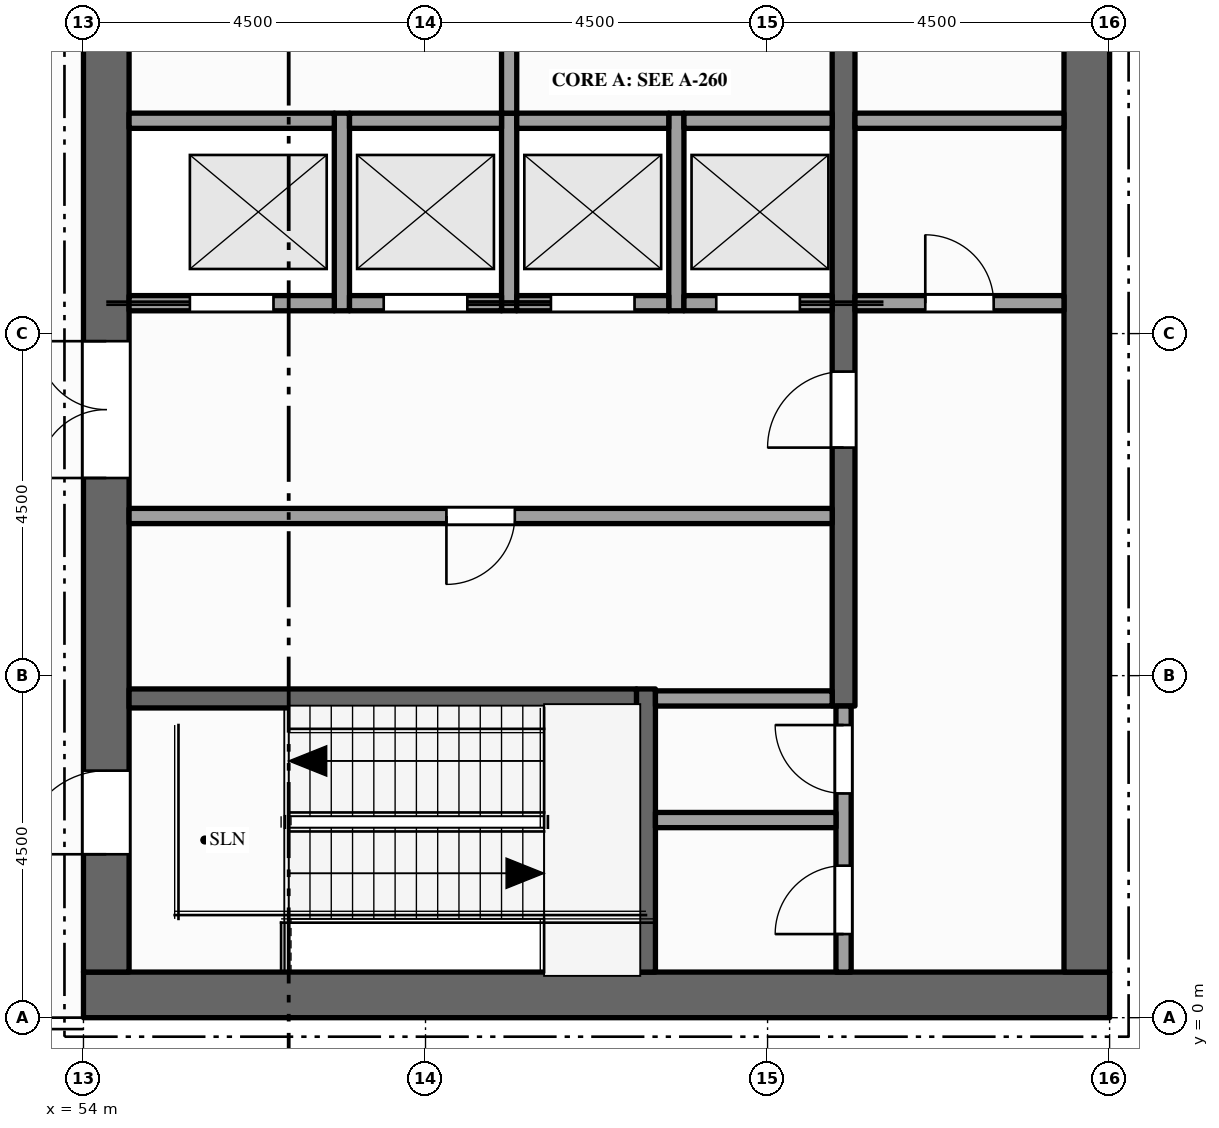
"""IFC4 building model, lengths in metres.
Left out: names, types, materials, properties, quantities, classifications, styles, units other than length and angle.
Written with IfcOpenShell. Run it as: python <this file> out.ifc"""

import sys

from ifc_helpers import new_model, si_unit, direction, frame, frame_2d, origin, place, context, subcontext, project, spatial, rectangle, extrude, element, fill, save


model = new_model("IFC4")
c1 = context("Model", 3, precision=1e-05, world=origin(), true_north=direction((0.0, 1.0)))
c2 = subcontext(c1, "Body", "Model", "MODEL_VIEW")
j1 = project(units=[si_unit("LENGTHUNIT", "METRE"), si_unit("PLANEANGLEUNIT", "RADIAN")], contexts=[c1])
p1 = place(None, origin())
s1 = spatial("IfcSite", under=j1, at=p1, CompositionType="ELEMENT")
p2 = place(p1, origin())
s2 = spatial("IfcBuilding", under=s1, at=p2, CompositionType="ELEMENT")
p3 = place(p2, frame((0.0, 0.0, 332.0)))
s3 = spatial("IfcBuildingStorey", under=s2, at=p3, CompositionType="ELEMENT", Elevation=332.0)
p4 = place(p3, frame((67.5, 0.3, -0.15), z_axis=(0.0, 0.0, 1.0), x_axis=(-1.0, 0.0, 0.0)))
e1 = element("IfcWall", 1, at=p4, inside=s3, PredefinedType="SHEAR", context=c2, shape_type="SweptSolid", body=[
    extrude(rectangle(XDim=13.5, YDim=0.6, at=frame_2d((6.75, 0.0))), origin(), (0.0, 0.0, 1.0), 4.5),
])
p5 = place(p3, frame((54.3, 0.6, -0.15), z_axis=(0.0, 0.0, 1.0), x_axis=(0.0, 1.0, 0.0)))
e2 = element("IfcWall", 2, at=p5, inside=s3, PredefinedType="SHEAR", context=c2, shape_type="SweptSolid", body=[
    extrude(rectangle(XDim=21.3, YDim=0.6, at=frame_2d((10.65, 0.0))), origin(), (0.0, 0.0, 1.0), 4.5),
])
p6 = place(p5, frame((6.5, 0.0, 0.15)))
e3 = element("IfcOpeningElement", 3, at=p6, cuts=e2, PredefinedType="OPENING", context=c2, shape_type="SweptSolid", body=[
    extrude(rectangle(XDim=1.8, YDim=2.1, at=frame_2d((0.9, 1.05))), frame((0.0, 0.31, 0.0), z_axis=(0.0, -1.0, 0.0), x_axis=(1.0, 0.0, 0.0)), (0.0, 0.0, 1.0), 0.62),
])
p7 = place(p5, frame((12.55, 0.0, 0.15)))
e4 = element("IfcOpeningElement", 4, at=p7, cuts=e2, PredefinedType="OPENING", context=c2, shape_type="SweptSolid", body=[
    extrude(rectangle(XDim=1.1, YDim=2.1, at=frame_2d((0.55, 1.05))), frame((0.0, 0.31, 0.0), z_axis=(0.0, -1.0, 0.0), x_axis=(1.0, 0.0, 0.0)), (0.0, 0.0, 1.0), 0.62),
])
p8 = place(p5, frame((1.55, 0.0, 0.15)))
e5 = element("IfcOpeningElement", 5, at=p8, cuts=e2, PredefinedType="OPENING", context=c2, shape_type="SweptSolid", body=[
    extrude(rectangle(XDim=1.1, YDim=2.1, at=frame_2d((0.55, 1.05))), frame((0.0, 0.31, 0.0), z_axis=(0.0, -1.0, 0.0), x_axis=(1.0, 0.0, 0.0)), (0.0, 0.0, 1.0), 0.62),
])
p9 = place(p5, frame((18.75, 0.0, 0.15)))
e6 = element("IfcOpeningElement", 6, at=p9, cuts=e2, PredefinedType="OPENING", context=c2, shape_type="SweptSolid", body=[
    extrude(rectangle(XDim=1.1, YDim=2.1, at=frame_2d((0.55, 1.05))), frame((0.0, 0.31, 0.0), z_axis=(0.0, -1.0, 0.0), x_axis=(1.0, 0.0, 0.0)), (0.0, 0.0, 1.0), 0.62),
])
p10 = place(p3, frame((67.2, 0.6, -0.15), z_axis=(0.0, 0.0, 1.0), x_axis=(0.0, 1.0, 0.0)))
e7 = element("IfcWall", 7, at=p10, inside=s3, PredefinedType="SHEAR", context=c2, shape_type="SweptSolid", body=[
    extrude(rectangle(XDim=21.3, YDim=0.6, at=frame_2d((10.65, 0.0))), origin(), (0.0, 0.0, 1.0), 4.5),
])
for number, where, z_axis, x_axis in (
    (8, (57.4, 9.3, 0.0), (0.0, 0.0, 1.0), (0.0, 1.0, 0.0)),
    (9, (59.6, 9.3, 0.0), (0.0, 0.0, 1.0), (0.0, 1.0, 0.0)),
):
    element("IfcWall", number, at=place(p3, frame(where, z_axis=z_axis, x_axis=x_axis)), inside=s3, PredefinedType="SOLIDWALL", context=c2, shape_type="SweptSolid", body=[
        extrude(rectangle(XDim=2.6, YDim=0.2, at=frame_2d((1.3, 0.0))), origin(), (0.0, 0.0, 1.0), 4.35),
    ])
p11 = place(p3, frame((59.6, 11.9, 0.0), z_axis=(0.0, 0.0, 1.0), x_axis=(0.0, 1.0, 0.0)))
e10 = element("IfcWall", 10, at=p11, inside=s3, PredefinedType="PARTITIONING", context=c2, shape_type="SweptSolid", body=[
    extrude(rectangle(XDim=3.6, YDim=0.2, at=frame_2d((1.8, 0.0))), origin(), (0.0, 0.0, 1.0), 4.35),
])
p12 = place(p11, frame((1.3, 0.0, 0.0)))
e11 = element("IfcOpeningElement", 11, at=p12, cuts=e10, PredefinedType="OPENING", context=c2, shape_type="SweptSolid", body=[
    extrude(rectangle(XDim=1.0, YDim=2.1, at=frame_2d((0.5, 1.05))), frame((0.0, 0.11, 0.0), z_axis=(0.0, -1.0, 0.0), x_axis=(1.0, 0.0, 0.0)), (0.0, 0.0, 1.0), 0.22),
])
p13 = place(p3, frame((61.4, 0.6, 0.0), z_axis=(0.0, 0.0, 1.0), x_axis=(0.0, 1.0, 0.0)))
e12 = element("IfcWall", 12, at=p13, inside=s3, PredefinedType="SHEAR", context=c2, shape_type="SweptSolid", body=[
    extrude(rectangle(XDim=3.725, YDim=0.25, at=frame_2d((1.862, 0.0))), origin(), (0.0, 0.0, 1.0), 4.35),
])
p14 = place(p3, frame((61.8, 9.3, 0.0), z_axis=(0.0, 0.0, 1.0), x_axis=(0.0, 1.0, 0.0)))
e13 = element("IfcWall", 13, at=p14, inside=s3, PredefinedType="SOLIDWALL", context=c2, shape_type="SweptSolid", body=[
    extrude(rectangle(XDim=2.6, YDim=0.2, at=frame_2d((1.3, 0.0))), origin(), (0.0, 0.0, 1.0), 4.35),
])
p15 = place(p3, frame((64.0, 0.6, 0.0), z_axis=(0.0, 0.0, 1.0), x_axis=(0.0, 1.0, 0.0)))
e14 = element("IfcWall", 14, at=p15, inside=s3, PredefinedType="PARTITIONING", context=c2, shape_type="SweptSolid", body=[
    extrude(rectangle(XDim=3.5, YDim=0.2, at=frame_2d((1.75, 0.0))), origin(), (0.0, 0.0, 1.0), 4.35),
])
p16 = place(p15, frame((0.5, 0.0, 0.0)))
e15 = element("IfcOpeningElement", 15, at=p16, cuts=e14, PredefinedType="OPENING", context=c2, shape_type="SweptSolid", body=[
    extrude(rectangle(XDim=0.9, YDim=2.1, at=frame_2d((0.45, 1.05))), frame((0.0, 0.11, 0.0), z_axis=(0.0, -1.0, 0.0), x_axis=(1.0, 0.0, 0.0)), (0.0, 0.0, 1.0), 0.22),
])
p17 = place(p15, frame((2.35, 0.0, 0.0)))
e16 = element("IfcOpeningElement", 16, at=p17, cuts=e14, PredefinedType="OPENING", context=c2, shape_type="SweptSolid", body=[
    extrude(rectangle(XDim=0.9, YDim=2.1, at=frame_2d((0.45, 1.05))), frame((0.0, 0.11, 0.0), z_axis=(0.0, -1.0, 0.0), x_axis=(1.0, 0.0, 0.0)), (0.0, 0.0, 1.0), 0.22),
])
p18 = place(p3, frame((64.0, 4.1, 0.0), z_axis=(0.0, 0.0, 1.0), x_axis=(0.0, 1.0, 0.0)))
e17 = element("IfcWall", 17, at=p18, inside=s3, PredefinedType="SHEAR", context=c2, shape_type="SweptSolid", body=[
    extrude(rectangle(XDim=14.5, YDim=0.3, at=frame_2d((7.25, 0.0))), origin(), (0.0, 0.0, 1.0), 4.35),
])
p19 = place(p18, frame((3.4, 0.0, 0.0)))
e18 = element("IfcOpeningElement", 18, at=p19, cuts=e17, PredefinedType="OPENING", context=c2, shape_type="SweptSolid", body=[
    extrude(rectangle(XDim=1.0, YDim=2.1, at=frame_2d((0.5, 1.05))), frame((0.0, 0.16, 0.0), z_axis=(0.0, -1.0, 0.0), x_axis=(1.0, 0.0, 0.0)), (0.0, 0.0, 1.0), 0.32),
])
p20 = place(p18, frame((9.1, 0.0, 0.0)))
e19 = element("IfcOpeningElement", 19, at=p20, cuts=e17, PredefinedType="OPENING", context=c2, shape_type="SweptSolid", body=[
    extrude(rectangle(XDim=1.0, YDim=2.1, at=frame_2d((0.5, 1.05))), frame((0.0, 0.16, 0.0), z_axis=(0.0, -1.0, 0.0), x_axis=(1.0, 0.0, 0.0)), (0.0, 0.0, 1.0), 0.32),
])
p21 = place(p3, frame((61.525, 2.6, 0.0), z_axis=(0.0, 0.0, 1.0), x_axis=(1.0, 0.0, 0.0)))
e20 = element("IfcWall", 20, at=p21, inside=s3, PredefinedType="PARTITIONING", context=c2, shape_type="SweptSolid", body=[
    extrude(rectangle(XDim=2.375, YDim=0.2, at=frame_2d((1.188, 0.0))), origin(), (0.0, 0.0, 1.0), 4.35),
])
p22 = place(p3, frame((54.6, 4.2, 0.0), z_axis=(0.0, 0.0, 1.0), x_axis=(1.0, 0.0, 0.0)))
e21 = element("IfcWall", 21, at=p22, inside=s3, PredefinedType="SHEAR", context=c2, shape_type="SweptSolid", body=[
    extrude(rectangle(XDim=6.675, YDim=0.25, at=frame_2d((3.337, 0.0))), origin(), (0.0, 0.0, 1.0), 4.35),
])
p23 = place(p3, frame((61.525, 4.2, 0.0), z_axis=(0.0, 0.0, 1.0), x_axis=(1.0, 0.0, 0.0)))
e22 = element("IfcWall", 22, at=p23, inside=s3, PredefinedType="PARTITIONING", context=c2, shape_type="SweptSolid", body=[
    extrude(rectangle(XDim=2.325, YDim=0.2, at=frame_2d((1.163, 0.0))), origin(), (0.0, 0.0, 1.0), 4.35),
])
p24 = place(p3, frame((54.6, 6.6, 0.0), z_axis=(0.0, 0.0, 1.0), x_axis=(1.0, 0.0, 0.0)))
e23 = element("IfcWall", 23, at=p24, inside=s3, PredefinedType="PARTITIONING", context=c2, shape_type="SweptSolid", body=[
    extrude(rectangle(XDim=9.25, YDim=0.2, at=frame_2d((4.625, 0.0))), origin(), (0.0, 0.0, 1.0), 4.35),
])
p25 = place(p24, frame((4.175, 0.0, 0.0)))
e24 = element("IfcOpeningElement", 24, at=p25, cuts=e23, PredefinedType="OPENING", context=c2, shape_type="SweptSolid", body=[
    extrude(rectangle(XDim=0.9, YDim=2.1, at=frame_2d((0.45, 1.05))), frame((0.0, 0.11, 0.0), z_axis=(0.0, -1.0, 0.0), x_axis=(1.0, 0.0, 0.0)), (0.0, 0.0, 1.0), 0.22),
])
p26 = place(p3, frame((54.6, 9.4, 0.0), z_axis=(0.0, 0.0, 1.0), x_axis=(1.0, 0.0, 0.0)))
e25 = element("IfcWall", 25, at=p26, inside=s3, PredefinedType="SOLIDWALL", context=c2, shape_type="SweptSolid", body=[
    extrude(rectangle(XDim=2.7, YDim=0.2, at=frame_2d((1.35, 0.0))), origin(), (0.0, 0.0, 1.0), 4.35),
])
p27 = place(p26, frame((0.8, 0.0, 0.012)))
e26 = element("IfcOpeningElement", 26, at=p27, cuts=e25, PredefinedType="OPENING", context=c2, shape_type="SweptSolid", body=[
    extrude(rectangle(XDim=1.1, YDim=2.1, at=frame_2d((0.55, 1.05))), frame((0.0, 0.11, 0.0), z_axis=(0.0, -1.0, 0.0), x_axis=(1.0, 0.0, 0.0)), (0.0, 0.0, 1.0), 0.22),
])
p28 = place(p3, frame((57.5, 9.4, 0.0), z_axis=(0.0, 0.0, 1.0), x_axis=(1.0, 0.0, 0.0)))
e27 = element("IfcWall", 27, at=p28, inside=s3, PredefinedType="SOLIDWALL", context=c2, shape_type="SweptSolid", body=[
    extrude(rectangle(XDim=2.0, YDim=0.2, at=frame_2d((1.0, 0.0))), origin(), (0.0, 0.0, 1.0), 4.35),
])
p29 = place(p28, frame((0.45, 0.0, 0.012)))
e28 = element("IfcOpeningElement", 28, at=p29, cuts=e27, PredefinedType="OPENING", context=c2, shape_type="SweptSolid", body=[
    extrude(rectangle(XDim=1.1, YDim=2.1, at=frame_2d((0.55, 1.05))), frame((0.0, 0.11, 0.0), z_axis=(0.0, -1.0, 0.0), x_axis=(1.0, 0.0, 0.0)), (0.0, 0.0, 1.0), 0.22),
])
p30 = place(p3, frame((59.7, 9.4, 0.0), z_axis=(0.0, 0.0, 1.0), x_axis=(1.0, 0.0, 0.0)))
e29 = element("IfcWall", 29, at=p30, inside=s3, PredefinedType="SOLIDWALL", context=c2, shape_type="SweptSolid", body=[
    extrude(rectangle(XDim=2.0, YDim=0.2, at=frame_2d((1.0, 0.0))), origin(), (0.0, 0.0, 1.0), 4.35),
])
p31 = place(p30, frame((0.45, 0.0, 0.012)))
e30 = element("IfcOpeningElement", 30, at=p31, cuts=e29, PredefinedType="OPENING", context=c2, shape_type="SweptSolid", body=[
    extrude(rectangle(XDim=1.1, YDim=2.1, at=frame_2d((0.55, 1.05))), frame((0.0, 0.11, 0.0), z_axis=(0.0, -1.0, 0.0), x_axis=(1.0, 0.0, 0.0)), (0.0, 0.0, 1.0), 0.22),
])
p32 = place(p3, frame((61.9, 9.4, 0.0), z_axis=(0.0, 0.0, 1.0), x_axis=(1.0, 0.0, 0.0)))
e31 = element("IfcWall", 31, at=p32, inside=s3, PredefinedType="SOLIDWALL", context=c2, shape_type="SweptSolid", body=[
    extrude(rectangle(XDim=1.95, YDim=0.2, at=frame_2d((0.975, 0.0))), origin(), (0.0, 0.0, 1.0), 4.35),
])
p33 = place(p32, frame((0.425, 0.0, 0.012)))
e32 = element("IfcOpeningElement", 32, at=p33, cuts=e31, PredefinedType="OPENING", context=c2, shape_type="SweptSolid", body=[
    extrude(rectangle(XDim=1.1, YDim=2.1, at=frame_2d((0.55, 1.05))), frame((0.0, 0.11, 0.0), z_axis=(0.0, -1.0, 0.0), x_axis=(1.0, 0.0, 0.0)), (0.0, 0.0, 1.0), 0.22),
])
p34 = place(p3, frame((64.15, 9.4, 0.0), z_axis=(0.0, 0.0, 1.0), x_axis=(1.0, 0.0, 0.0)))
e33 = element("IfcWall", 33, at=p34, inside=s3, PredefinedType="PARTITIONING", context=c2, shape_type="SweptSolid", body=[
    extrude(rectangle(XDim=2.75, YDim=0.2, at=frame_2d((1.375, 0.0))), origin(), (0.0, 0.0, 1.0), 4.35),
])
p35 = place(p34, frame((0.925, 0.0, 0.0)))
e34 = element("IfcOpeningElement", 34, at=p35, cuts=e33, PredefinedType="OPENING", context=c2, shape_type="SweptSolid", body=[
    extrude(rectangle(XDim=0.9, YDim=2.1, at=frame_2d((0.45, 1.05))), frame((0.0, 0.11, 0.0), z_axis=(0.0, -1.0, 0.0), x_axis=(1.0, 0.0, 0.0)), (0.0, 0.0, 1.0), 0.22),
])
p36 = place(p3, frame((54.6, 11.8, 0.0), z_axis=(0.0, 0.0, 1.0), x_axis=(1.0, 0.0, 0.0)))
e35 = element("IfcWall", 35, at=p36, inside=s3, PredefinedType="SOLIDWALL", context=c2, shape_type="SweptSolid", body=[
    extrude(rectangle(XDim=2.7, YDim=0.2, at=frame_2d((1.35, 0.0))), origin(), (0.0, 0.0, 1.0), 4.35),
])
for number, where, z_axis, x_axis in (
    (36, (57.5, 11.8, 0.0), (0.0, 0.0, 1.0), (1.0, 0.0, 0.0)),
    (37, (59.7, 11.8, 0.0), (0.0, 0.0, 1.0), (1.0, 0.0, 0.0)),
):
    element("IfcWall", number, at=place(p3, frame(where, z_axis=z_axis, x_axis=x_axis)), inside=s3, PredefinedType="SOLIDWALL", context=c2, shape_type="SweptSolid", body=[
        extrude(rectangle(XDim=2.0, YDim=0.2, at=frame_2d((1.0, 0.0))), origin(), (0.0, 0.0, 1.0), 4.35),
    ])
p37 = place(p3, frame((61.9, 11.8, 0.0), z_axis=(0.0, 0.0, 1.0), x_axis=(1.0, 0.0, 0.0)))
e38 = element("IfcWall", 38, at=p37, inside=s3, PredefinedType="SOLIDWALL", context=c2, shape_type="SweptSolid", body=[
    extrude(rectangle(XDim=1.95, YDim=0.2, at=frame_2d((0.975, 0.0))), origin(), (0.0, 0.0, 1.0), 4.35),
])
p38 = place(p3, frame((64.15, 11.8, 0.0), z_axis=(0.0, 0.0, 1.0), x_axis=(1.0, 0.0, 0.0)))
e39 = element("IfcWall", 39, at=p38, inside=s3, PredefinedType="PARTITIONING", context=c2, shape_type="SweptSolid", body=[
    extrude(rectangle(XDim=2.75, YDim=0.2, at=frame_2d((1.375, 0.0))), origin(), (0.0, 0.0, 1.0), 4.35),
])
p39 = place(p27, origin())
e40 = element("IfcDoor", 40, at=p39, inside=s3, OperationType="SLIDING_TO_LEFT", PredefinedType="DOOR", context=c2, shape_type="SweptSolid", body=[
    extrude(rectangle(XDim=1.1, YDim=2.1, at=frame_2d((0.55, 1.05))), frame((0.0, 0.025, 0.0), z_axis=(0.0, -1.0, 0.0), x_axis=(1.0, 0.0, 0.0)), (0.0, 0.0, 1.0), 0.05),
])
fill(e26, e40)
p40 = place(p29, origin())
e41 = element("IfcDoor", 41, at=p40, inside=s3, OperationType="SLIDING_TO_RIGHT", PredefinedType="DOOR", context=c2, shape_type="SweptSolid", body=[
    extrude(rectangle(XDim=1.1, YDim=2.1, at=frame_2d((0.55, 1.05))), frame((0.0, 0.025, 0.0), z_axis=(0.0, -1.0, 0.0), x_axis=(1.0, 0.0, 0.0)), (0.0, 0.0, 1.0), 0.05),
])
fill(e28, e41)
p41 = place(p31, origin())
e42 = element("IfcDoor", 42, at=p41, inside=s3, OperationType="SLIDING_TO_LEFT", PredefinedType="DOOR", context=c2, shape_type="SweptSolid", body=[
    extrude(rectangle(XDim=1.1, YDim=2.1, at=frame_2d((0.55, 1.05))), frame((0.0, 0.025, 0.0), z_axis=(0.0, -1.0, 0.0), x_axis=(1.0, 0.0, 0.0)), (0.0, 0.0, 1.0), 0.05),
])
fill(e30, e42)
p42 = place(p33, origin())
e43 = element("IfcDoor", 43, at=p42, inside=s3, OperationType="SLIDING_TO_RIGHT", PredefinedType="DOOR", context=c2, shape_type="SweptSolid", body=[
    extrude(rectangle(XDim=1.1, YDim=2.1, at=frame_2d((0.55, 1.05))), frame((0.0, 0.025, 0.0), z_axis=(0.0, -1.0, 0.0), x_axis=(1.0, 0.0, 0.0)), (0.0, 0.0, 1.0), 0.05),
])
fill(e32, e43)
p43 = place(p6, origin())
e44 = element("IfcDoor", 44, at=p43, inside=s3, OperationType="DOUBLE_DOOR_SINGLE_SWING", PredefinedType="DOOR", context=c2, shape_type="SweptSolid", body=[
    extrude(rectangle(XDim=1.8, YDim=2.1, at=frame_2d((0.9, 1.05))), frame((0.0, 0.025, 0.0), z_axis=(0.0, -1.0, 0.0), x_axis=(1.0, 0.0, 0.0)), (0.0, 0.0, 1.0), 0.05),
])
fill(e3, e44)
p44 = place(p19, origin())
e45 = element("IfcDoor", 45, at=p44, inside=s3, OperationType="SINGLE_SWING_LEFT", PredefinedType="DOOR", context=c2, shape_type="SweptSolid", body=[
    extrude(rectangle(XDim=1.0, YDim=2.1, at=frame_2d((0.5, 1.05))), frame((0.0, 0.025, 0.0), z_axis=(0.0, -1.0, 0.0), x_axis=(1.0, 0.0, 0.0)), (0.0, 0.0, 1.0), 0.05),
])
fill(e18, e45)
p45 = place(p35, origin())
e46 = element("IfcDoor", 46, at=p45, inside=s3, OperationType="SINGLE_SWING_LEFT", PredefinedType="DOOR", context=c2, shape_type="SweptSolid", body=[
    extrude(rectangle(XDim=0.9, YDim=2.1, at=frame_2d((0.45, 1.05))), frame((0.0, 0.025, 0.0), z_axis=(0.0, -1.0, 0.0), x_axis=(1.0, 0.0, 0.0)), (0.0, 0.0, 1.0), 0.05),
])
fill(e34, e46)
p46 = place(p8, origin())
e47 = element("IfcDoor", 47, at=p46, inside=s3, OperationType="SINGLE_SWING_LEFT", PredefinedType="DOOR", context=c2, shape_type="SweptSolid", body=[
    extrude(rectangle(XDim=1.1, YDim=2.1, at=frame_2d((0.55, 1.05))), frame((0.0, 0.025, 0.0), z_axis=(0.0, -1.0, 0.0), x_axis=(1.0, 0.0, 0.0)), (0.0, 0.0, 1.0), 0.05),
])
fill(e5, e47)
p47 = place(p16, origin())
e48 = element("IfcDoor", 48, at=p47, inside=s3, OperationType="SINGLE_SWING_LEFT", PredefinedType="DOOR", context=c2, shape_type="SweptSolid", body=[
    extrude(rectangle(XDim=0.9, YDim=2.1, at=frame_2d((0.45, 1.05))), frame((0.0, 0.025, 0.0), z_axis=(0.0, -1.0, 0.0), x_axis=(1.0, 0.0, 0.0)), (0.0, 0.0, 1.0), 0.05),
])
fill(e15, e48)
p48 = place(p17, origin())
e49 = element("IfcDoor", 49, at=p48, inside=s3, OperationType="SINGLE_SWING_RIGHT", PredefinedType="DOOR", context=c2, shape_type="SweptSolid", body=[
    extrude(rectangle(XDim=0.9, YDim=2.1, at=frame_2d((0.45, 1.05))), frame((0.0, 0.025, 0.0), z_axis=(0.0, -1.0, 0.0), x_axis=(1.0, 0.0, 0.0)), (0.0, 0.0, 1.0), 0.05),
])
fill(e16, e49)
p49 = place(p25, origin())
e50 = element("IfcDoor", 50, at=p49, inside=s3, OperationType="SINGLE_SWING_LEFT", PredefinedType="DOOR", context=c2, shape_type="SweptSolid", body=[
    extrude(rectangle(XDim=0.9, YDim=2.1, at=frame_2d((0.45, 1.05))), frame((0.0, 0.025, 0.0), z_axis=(0.0, -1.0, 0.0), x_axis=(1.0, 0.0, 0.0)), (0.0, 0.0, 1.0), 0.05),
])
fill(e24, e50)
save(model, sys.argv[1])
